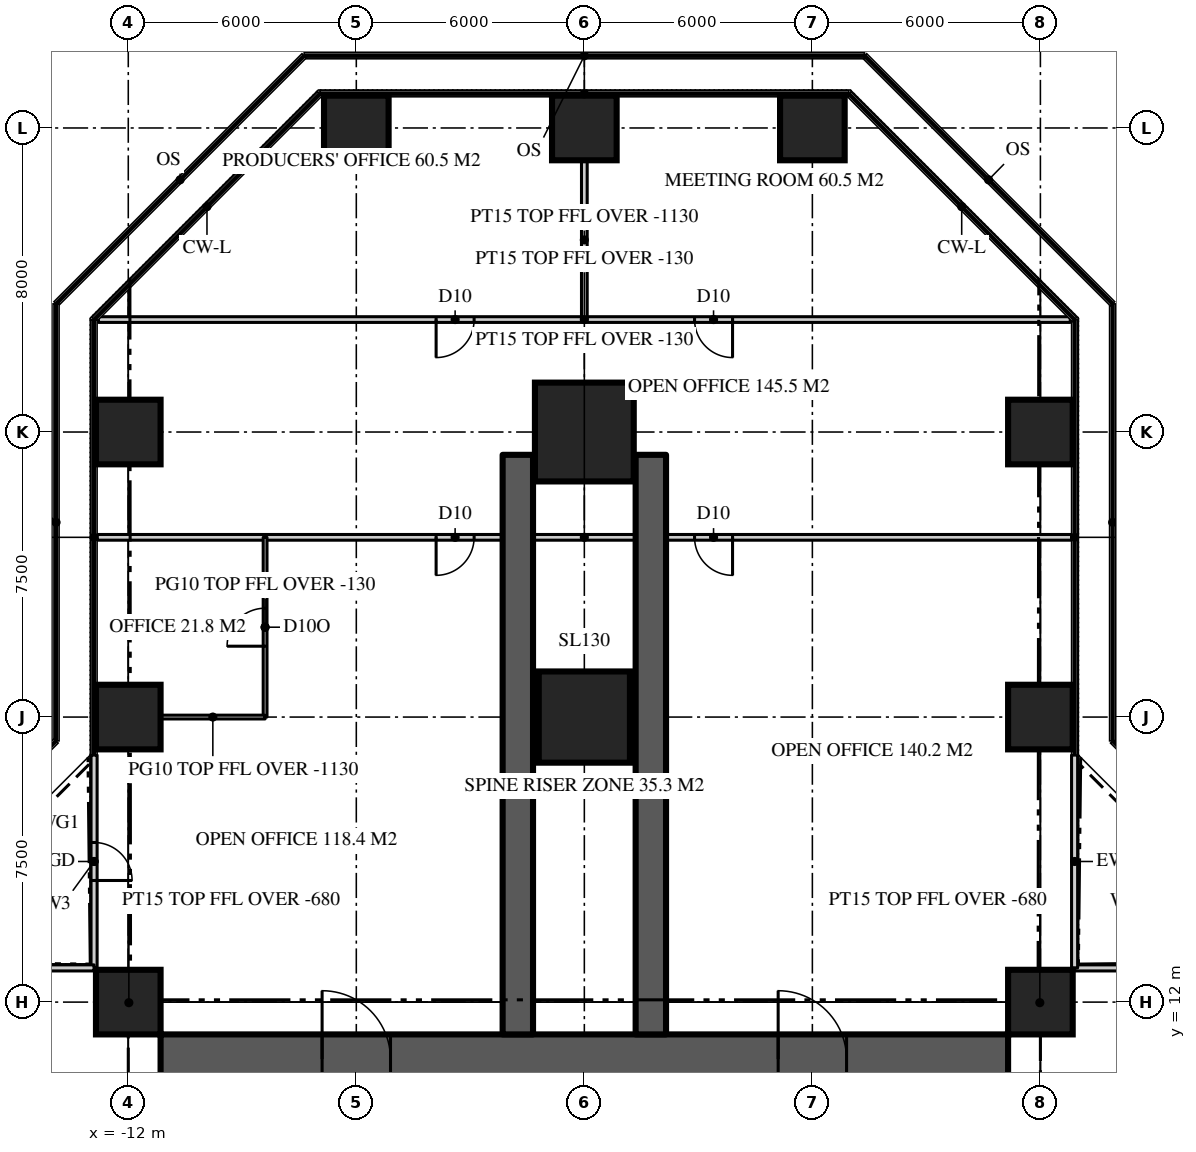
"""IFC4 building model, lengths in metres.
Left out: names, types, materials, properties, quantities, classifications, styles, units other than length and angle.
Written with IfcOpenShell. Run it as: python <this file> out.ifc"""

import sys

from ifc_helpers import new_model, si_unit, direction, frame, frame_2d, origin, origin_2d, place, context, subcontext, project, spatial, rectangle, extrude, element, fill, save


model = new_model("IFC4")
c1 = context("Model", 3, precision=1e-05, world=origin(), true_north=direction((0.0, 1.0)))
c2 = subcontext(c1, "Body", "Model", "MODEL_VIEW")
j1 = project(units=[si_unit("LENGTHUNIT", "METRE"), si_unit("PLANEANGLEUNIT", "RADIAN")], contexts=[c1])
p1 = place(None, origin())
s1 = spatial("IfcSite", under=j1, at=p1, CompositionType="ELEMENT")
p2 = place(p1, origin())
s2 = spatial("IfcBuilding", under=s1, at=p2, CompositionType="ELEMENT")
p3 = place(p2, frame((0.0, 0.0, 43.5)))
s3 = spatial("IfcBuildingStorey", under=s2, at=p3, CompositionType="ELEMENT", Elevation=43.5)
p4 = place(p3, frame((-11.15, 10.5, 0.0), z_axis=(0.0, 0.0, 1.0), x_axis=(1.0, 0.0, 0.0)))
e1 = element("IfcWall", 1, at=p4, inside=s3, PredefinedType="SHEAR", context=c2, shape_type="SweptSolid", body=[
    extrude(rectangle(XDim=22.3, YDim=1.3, at=frame_2d((11.15, 0.0))), origin(), (0.0, 0.0, 1.0), 3.9),
])
p5 = place(p4, frame((4.25, 0.0, 0.0)))
e2 = element("IfcOpeningElement", 2, at=p5, cuts=e1, PredefinedType="OPENING", context=c2, shape_type="SweptSolid", body=[
    extrude(rectangle(XDim=1.8, YDim=2.2, at=frame_2d((0.9, 1.1))), frame((0.0, 0.66, 0.0), z_axis=(0.0, -1.0, 0.0), x_axis=(1.0, 0.0, 0.0)), (0.0, 0.0, 1.0), 1.32),
])
p6 = place(p4, frame((16.25, 0.0, 0.0)))
e3 = element("IfcOpeningElement", 3, at=p6, cuts=e1, PredefinedType="OPENING", context=c2, shape_type="SweptSolid", body=[
    extrude(rectangle(XDim=1.8, YDim=2.2, at=frame_2d((0.9, 1.1))), frame((0.0, 0.66, 0.0), z_axis=(0.0, -1.0, 0.0), x_axis=(1.0, 0.0, 0.0)), (0.0, 0.0, 1.0), 1.32),
])
for number, where, z_axis, x_axis in (
    (4, (1.75, 11.15, 0.0), (0.0, 0.0, 1.0), (0.0, 1.0, 0.0)),
    (5, (-1.75, 11.15, 0.0), (0.0, 0.0, 1.0), (0.0, 1.0, 0.0)),
):
    element("IfcWall", number, at=place(p3, frame(where, z_axis=z_axis, x_axis=x_axis)), inside=s3, PredefinedType="SHEAR", context=c2, shape_type="SweptSolid", body=[
        extrude(rectangle(XDim=15.25, YDim=0.8, at=frame_2d((7.625, 0.0))), origin(), (0.0, 0.0, 1.0), 3.9),
    ])
for number, where, z_axis, x_axis in (
    (6, (-12.0, 12.0, 0.0), (0.0, 0.0, 1.0), (1.0, 0.0, 0.0)),
    (7, (12.0, 12.0, 0.0), (0.0, 0.0, 1.0), (1.0, 0.0, 0.0)),
    (8, (-12.0, 19.5, 0.0), (0.0, 0.0, 1.0), (1.0, 0.0, 0.0)),
):
    element("IfcColumn", number, at=place(p3, frame(where, z_axis=z_axis, x_axis=x_axis)), inside=s3, PredefinedType="COLUMN", context=c2, shape_type="SweptSolid", body=[
        extrude(rectangle(XDim=1.7, YDim=1.7, at=origin_2d()), origin(), (0.0, 0.0, 1.0), 3.9),
    ])
p7 = place(p3, frame((0.0, 19.5, 0.0), z_axis=(0.0, 0.0, 1.0), x_axis=(1.0, 0.0, 0.0)))
e9 = element("IfcColumn", 9, at=p7, inside=s3, PredefinedType="COLUMN", context=c2, shape_type="SweptSolid", body=[
    extrude(rectangle(XDim=2.4, YDim=2.4, at=origin_2d()), origin(), (0.0, 0.0, 1.0), 3.9),
])
for number, where, z_axis, x_axis in (
    (10, (12.0, 19.5, 0.0), (0.0, 0.0, 1.0), (1.0, 0.0, 0.0)),
    (11, (-12.0, 27.0, 0.0), (0.0, 0.0, 1.0), (1.0, 0.0, 0.0)),
):
    element("IfcColumn", number, at=place(p3, frame(where, z_axis=z_axis, x_axis=x_axis)), inside=s3, PredefinedType="COLUMN", context=c2, shape_type="SweptSolid", body=[
        extrude(rectangle(XDim=1.7, YDim=1.7, at=origin_2d()), origin(), (0.0, 0.0, 1.0), 3.9),
    ])
p8 = place(p3, frame((0.0, 27.0, 0.0), z_axis=(0.0, 0.0, 1.0), x_axis=(1.0, 0.0, 0.0)))
e12 = element("IfcColumn", 12, at=p8, inside=s3, PredefinedType="COLUMN", context=c2, shape_type="SweptSolid", body=[
    extrude(rectangle(XDim=2.6, YDim=2.6, at=origin_2d()), origin(), (0.0, 0.0, 1.0), 3.9),
])
for number, where, z_axis, x_axis in (
    (13, (12.0, 27.0, 0.0), (0.0, 0.0, 1.0), (1.0, 0.0, 0.0)),
    (14, (-6.0, 35.0, 0.0), (0.0, 0.0, 1.0), (1.0, 0.0, 0.0)),
    (15, (0.0, 35.0, 0.0), (0.0, 0.0, 1.0), (1.0, 0.0, 0.0)),
    (16, (6.0, 35.0, 0.0), (0.0, 0.0, 1.0), (1.0, 0.0, 0.0)),
):
    element("IfcColumn", number, at=place(p3, frame(where, z_axis=z_axis, x_axis=x_axis)), inside=s3, PredefinedType="COLUMN", context=c2, shape_type="SweptSolid", body=[
        extrude(rectangle(XDim=1.7, YDim=1.7, at=origin_2d()), origin(), (0.0, 0.0, 1.0), 3.9),
    ])
p9 = place(p3, frame((18.5, 12.9, 0.0), z_axis=(0.0, 0.0, 1.0), x_axis=(-1.0, 0.0, 0.0)))
e17 = element("IfcWall", 17, at=p9, inside=s3, PredefinedType="SOLIDWALL", context=c2, shape_type="SweptSolid", body=[
    extrude(rectangle(XDim=5.6, YDim=0.16, at=frame_2d((2.8, 0.0))), origin(), (0.0, 0.0, 1.0), 3.77),
])
p10 = place(p9, frame((2.3, 0.0, 0.0)))
e18 = element("IfcOpeningElement", 18, at=p10, cuts=e17, PredefinedType="OPENING", context=c2, shape_type="SweptSolid", body=[
    extrude(rectangle(XDim=1.0, YDim=2.2, at=frame_2d((0.5, 1.1))), frame((0.0, 0.09, 0.0), z_axis=(0.0, -1.0, 0.0), x_axis=(1.0, 0.0, 0.0)), (0.0, 0.0, 1.0), 0.18),
])
p11 = place(p3, frame((12.9, 12.9, 0.0), z_axis=(0.0, 0.0, 1.0), x_axis=(0.0, 1.0, 0.0)))
e19 = element("IfcWall", 19, at=p11, inside=s3, PredefinedType="SOLIDWALL", context=c2, shape_type="SweptSolid", body=[
    extrude(rectangle(XDim=5.6, YDim=0.16, at=frame_2d((2.8, 0.0))), origin(), (0.0, 0.0, 1.0), 3.77),
])
p12 = place(p3, frame((-12.9, 18.5, 0.0), z_axis=(0.0, 0.0, 1.0), x_axis=(0.0, -1.0, 0.0)))
e20 = element("IfcWall", 20, at=p12, inside=s3, PredefinedType="SOLIDWALL", context=c2, shape_type="SweptSolid", body=[
    extrude(rectangle(XDim=5.6, YDim=0.16, at=frame_2d((2.8, 0.0))), origin(), (0.0, 0.0, 1.0), 3.77),
])
p13 = place(p12, frame((2.3, 0.0, 0.0)))
e21 = element("IfcOpeningElement", 21, at=p13, cuts=e20, PredefinedType="OPENING", context=c2, shape_type="SweptSolid", body=[
    extrude(rectangle(XDim=1.0, YDim=2.2, at=frame_2d((0.5, 1.1))), frame((0.0, 0.09, 0.0), z_axis=(0.0, -1.0, 0.0), x_axis=(1.0, 0.0, 0.0)), (0.0, 0.0, 1.0), 0.18),
])
p14 = place(p3, frame((-12.9, 12.9, 0.0), z_axis=(0.0, 0.0, 1.0), x_axis=(-1.0, 0.0, 0.0)))
e22 = element("IfcWall", 22, at=p14, inside=s3, PredefinedType="SOLIDWALL", context=c2, shape_type="SweptSolid", body=[
    extrude(rectangle(XDim=5.6, YDim=0.16, at=frame_2d((2.8, 0.0))), origin(), (0.0, 0.0, 1.0), 3.77),
])
p15 = place(p3, frame((12.82, 24.229, 0.0), z_axis=(0.0, 0.0, 1.0), x_axis=(-1.0, 0.0, 0.0)))
e23 = element("IfcWall", 23, at=p15, inside=s3, PredefinedType="PARTITIONING", context=c2, shape_type="SweptSolid", body=[
    extrude(rectangle(XDim=25.64, YDim=0.15, at=frame_2d((12.82, 0.0))), origin(), (0.0, 0.0, 1.0), 3.77),
])
p16 = place(p15, frame((15.72, 0.0, 0.0)))
e24 = element("IfcOpeningElement", 24, at=p16, cuts=e23, PredefinedType="OPENING", context=c2, shape_type="SweptSolid", body=[
    extrude(rectangle(XDim=1.0, YDim=2.2, at=frame_2d((0.5, 1.1))), frame((0.0, 0.085, 0.0), z_axis=(0.0, -1.0, 0.0), x_axis=(1.0, 0.0, 0.0)), (0.0, 0.0, 1.0), 0.17),
])
p17 = place(p15, frame((8.92, 0.0, 0.0)))
e25 = element("IfcOpeningElement", 25, at=p17, cuts=e23, PredefinedType="OPENING", context=c2, shape_type="SweptSolid", body=[
    extrude(rectangle(XDim=1.0, YDim=2.2, at=frame_2d((0.5, 1.1))), frame((0.0, 0.085, 0.0), z_axis=(0.0, -1.0, 0.0), x_axis=(1.0, 0.0, 0.0)), (0.0, 0.0, 1.0), 0.17),
])
p18 = place(p3, frame((12.786, 29.959, 0.0), z_axis=(0.0, 0.0, 1.0), x_axis=(-1.0, 0.0, 0.0)))
e26 = element("IfcWall", 26, at=p18, inside=s3, PredefinedType="PARTITIONING", context=c2, shape_type="SweptSolid", body=[
    extrude(rectangle(XDim=25.573, YDim=0.15, at=frame_2d((12.786, 0.0))), origin(), (0.0, 0.0, 1.0), 3.77),
])
p19 = place(p18, frame((15.687, 0.0, 0.0)))
e27 = element("IfcOpeningElement", 27, at=p19, cuts=e26, PredefinedType="OPENING", context=c2, shape_type="SweptSolid", body=[
    extrude(rectangle(XDim=1.0, YDim=2.2, at=frame_2d((0.5, 1.1))), frame((0.0, 0.085, 0.0), z_axis=(0.0, -1.0, 0.0), x_axis=(1.0, 0.0, 0.0)), (0.0, 0.0, 1.0), 0.17),
])
p20 = place(p18, frame((8.886, 0.0, 0.0)))
e28 = element("IfcOpeningElement", 28, at=p20, cuts=e26, PredefinedType="OPENING", context=c2, shape_type="SweptSolid", body=[
    extrude(rectangle(XDim=1.0, YDim=2.2, at=frame_2d((0.5, 1.1))), frame((0.0, 0.085, 0.0), z_axis=(0.0, -1.0, 0.0), x_axis=(1.0, 0.0, 0.0)), (0.0, 0.0, 1.0), 0.17),
])
p21 = place(p3, frame((0.0, 29.959, 0.0), z_axis=(0.0, 0.0, 1.0), x_axis=(0.0, 1.0, 0.0)))
e29 = element("IfcWall", 29, at=p21, inside=s3, PredefinedType="PARTITIONING", context=c2, shape_type="SweptSolid", body=[
    extrude(rectangle(XDim=4.191, YDim=0.15, at=frame_2d((2.095, 0.0))), origin(), (0.0, 0.0, 1.0), 2.77),
])
p22 = place(p3, frame((-8.4, 19.5, 0.0), z_axis=(0.0, 0.0, 1.0), x_axis=(0.0, 1.0, 0.0)))
e30 = element("IfcWall", 30, at=p22, inside=s3, PredefinedType="PARTITIONING", context=c2, shape_type="SweptSolid", body=[
    extrude(rectangle(XDim=4.729, YDim=0.1, at=frame_2d((2.365, 0.0))), origin(), (0.0, 0.0, 1.0), 3.77),
])
p23 = place(p22, frame((1.865, 0.0, 0.0)))
e31 = element("IfcOpeningElement", 31, at=p23, cuts=e30, PredefinedType="OPENING", context=c2, shape_type="SweptSolid", body=[
    extrude(rectangle(XDim=1.0, YDim=2.2, at=frame_2d((0.5, 1.1))), frame((0.0, 0.06, 0.0), z_axis=(0.0, -1.0, 0.0), x_axis=(1.0, 0.0, 0.0)), (0.0, 0.0, 1.0), 0.12),
])
p24 = place(p3, frame((-8.4, 19.5, 0.0), z_axis=(0.0, 0.0, 1.0), x_axis=(-1.0, 0.0, 0.0)))
e32 = element("IfcWall", 32, at=p24, inside=s3, PredefinedType="PARTITIONING", context=c2, shape_type="SweptSolid", body=[
    extrude(rectangle(XDim=2.75, YDim=0.1, at=frame_2d((1.375, 0.0))), origin(), (0.0, 0.0, 1.0), 2.77),
])
for number, where, z_axis, x_axis in (
    (33, (11.15, 11.15, 0.0), (0.0, 0.0, 1.0), (0.707, 0.707, 0.0)),
    (34, (-11.15, 11.15, 0.0), (0.0, 0.0, 1.0), (-0.707, 0.707, 0.0)),
):
    element("IfcWall", number, at=place(p3, frame(where, z_axis=z_axis, x_axis=x_axis)), inside=s3, PredefinedType="PARTITIONING", context=c2, shape_type="SweptSolid", body=[
        extrude(rectangle(XDim=2.362, YDim=0.15, at=frame_2d((1.181, 0.0))), origin(), (0.0, 0.0, 1.0), 3.22),
    ])
p25 = place(p13, origin())
e35 = element("IfcDoor", 35, at=p25, inside=s3, OperationType="SINGLE_SWING_RIGHT", PredefinedType="DOOR", context=c2, shape_type="SweptSolid", body=[
    extrude(rectangle(XDim=1.0, YDim=2.2, at=frame_2d((0.5, 1.1))), frame((0.0, 0.025, 0.0), z_axis=(0.0, -1.0, 0.0), x_axis=(1.0, 0.0, 0.0)), (0.0, 0.0, 1.0), 0.05),
])
fill(e21, e35)
p26 = place(p5, origin())
e36 = element("IfcDoor", 36, at=p26, inside=s3, OperationType="DOUBLE_DOOR_DOUBLE_SWING", PredefinedType="DOOR", context=c2, shape_type="SweptSolid", body=[
    extrude(rectangle(XDim=1.8, YDim=2.2, at=frame_2d((0.9, 1.1))), frame((0.0, 0.025, 0.0), z_axis=(0.0, -1.0, 0.0), x_axis=(1.0, 0.0, 0.0)), (0.0, 0.0, 1.0), 0.05),
])
fill(e2, e36)
p27 = place(p6, origin())
e37 = element("IfcDoor", 37, at=p27, inside=s3, OperationType="DOUBLE_DOOR_DOUBLE_SWING", PredefinedType="DOOR", context=c2, shape_type="SweptSolid", body=[
    extrude(rectangle(XDim=1.8, YDim=2.2, at=frame_2d((0.9, 1.1))), frame((0.0, 0.025, 0.0), z_axis=(0.0, -1.0, 0.0), x_axis=(1.0, 0.0, 0.0)), (0.0, 0.0, 1.0), 0.05),
])
fill(e3, e37)
p28 = place(p16, origin())
e38 = element("IfcDoor", 38, at=p28, inside=s3, OperationType="SINGLE_SWING_RIGHT", PredefinedType="DOOR", context=c2, shape_type="SweptSolid", body=[
    extrude(rectangle(XDim=1.0, YDim=2.2, at=frame_2d((0.5, 1.1))), frame((0.0, 0.025, 0.0), z_axis=(0.0, -1.0, 0.0), x_axis=(1.0, 0.0, 0.0)), (0.0, 0.0, 1.0), 0.05),
])
fill(e24, e38)
p29 = place(p17, origin())
e39 = element("IfcDoor", 39, at=p29, inside=s3, OperationType="SINGLE_SWING_LEFT", PredefinedType="DOOR", context=c2, shape_type="SweptSolid", body=[
    extrude(rectangle(XDim=1.0, YDim=2.2, at=frame_2d((0.5, 1.1))), frame((0.0, 0.025, 0.0), z_axis=(0.0, -1.0, 0.0), x_axis=(1.0, 0.0, 0.0)), (0.0, 0.0, 1.0), 0.05),
])
fill(e25, e39)
p30 = place(p19, origin())
e40 = element("IfcDoor", 40, at=p30, inside=s3, OperationType="SINGLE_SWING_RIGHT", PredefinedType="DOOR", context=c2, shape_type="SweptSolid", body=[
    extrude(rectangle(XDim=1.0, YDim=2.2, at=frame_2d((0.5, 1.1))), frame((0.0, 0.025, 0.0), z_axis=(0.0, -1.0, 0.0), x_axis=(1.0, 0.0, 0.0)), (0.0, 0.0, 1.0), 0.05),
])
fill(e27, e40)
p31 = place(p20, origin())
e41 = element("IfcDoor", 41, at=p31, inside=s3, OperationType="SINGLE_SWING_LEFT", PredefinedType="DOOR", context=c2, shape_type="SweptSolid", body=[
    extrude(rectangle(XDim=1.0, YDim=2.2, at=frame_2d((0.5, 1.1))), frame((0.0, 0.025, 0.0), z_axis=(0.0, -1.0, 0.0), x_axis=(1.0, 0.0, 0.0)), (0.0, 0.0, 1.0), 0.05),
])
fill(e28, e41)
p32 = place(p23, origin())
e42 = element("IfcDoor", 42, at=p32, inside=s3, OperationType="SINGLE_SWING_LEFT", PredefinedType="DOOR", context=c2, shape_type="SweptSolid", body=[
    extrude(rectangle(XDim=1.0, YDim=2.2, at=frame_2d((0.5, 1.1))), frame((0.0, 0.025, 0.0), z_axis=(0.0, -1.0, 0.0), x_axis=(1.0, 0.0, 0.0)), (0.0, 0.0, 1.0), 0.05),
])
fill(e31, e42)
save(model, sys.argv[1])
